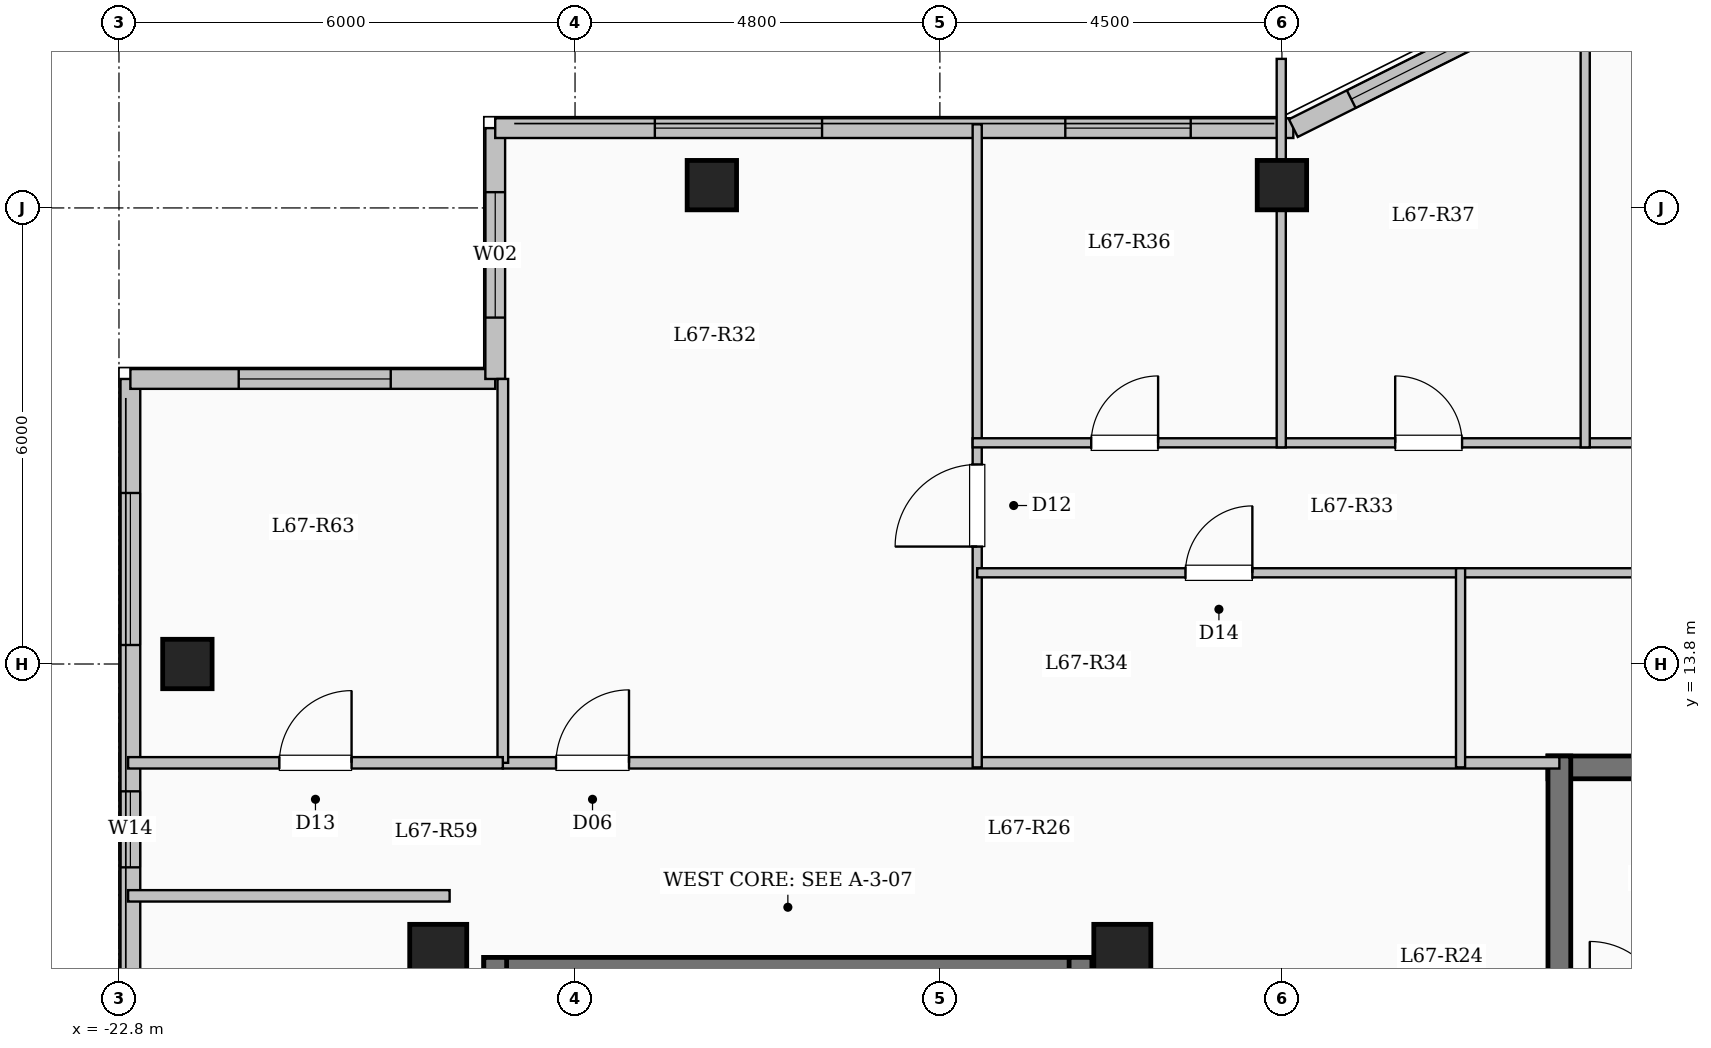
"""IFC4 building model, lengths in metres.
Left out: names, types, materials, properties, quantities, classifications, styles, units other than length and angle.
Written with IfcOpenShell. Run it as: python <this file> out.ifc"""

import sys

from ifc_helpers import new_model, si_unit, direction, frame, frame_2d, origin, origin_2d, place, context, subcontext, project, spatial, rectangle, extrude, element, fill, save


model = new_model("IFC4")
c1 = context("Model", 3, precision=1e-05, world=origin(), true_north=direction((0.0, 1.0)))
c2 = subcontext(c1, "Body", "Model", "MODEL_VIEW")
j1 = project(units=[si_unit("LENGTHUNIT", "METRE"), si_unit("PLANEANGLEUNIT", "RADIAN")], contexts=[c1])
p1 = place(None, origin())
s1 = spatial("IfcSite", under=j1, at=p1, CompositionType="ELEMENT")
p2 = place(p1, origin())
s2 = spatial("IfcBuilding", under=s1, at=p2, CompositionType="ELEMENT")
p3 = place(p2, frame((0.0, 0.0, 248.2)))
s3 = spatial("IfcBuildingStorey", under=s2, at=p3, CompositionType="ELEMENT", Elevation=248.2)
for number, where, z_axis, x_axis in (
    (1, (-9.6, 10.0, 0.0), (0.0, 0.0, 1.0), (1.0, 0.0, 0.0)),
    (2, (-18.6, 10.0, 0.0), (0.0, 0.0, 1.0), (1.0, 0.0, 0.0)),
):
    element("IfcColumn", number, at=place(p3, frame(where, z_axis=z_axis, x_axis=x_axis)), inside=s3, PredefinedType="COLUMN", context=c2, shape_type="SweptSolid", body=[
        extrude(rectangle(XDim=0.75, YDim=0.75, at=origin_2d()), origin(), (0.0, 0.0, 1.0), 3.35),
    ])
for number, where, z_axis, x_axis in (
    (3, (-15.0, 20.1, 0.0), (0.0, 0.0, 1.0), (1.0, 0.0, 0.0)),
    (4, (-7.5, 20.1, 0.0), (0.0, 0.0, 1.0), (1.0, 0.0, 0.0)),
    (5, (-21.9, 13.8, 0.0), (0.0, 0.0, 1.0), (1.0, 0.0, 0.0)),
):
    element("IfcColumn", number, at=place(p3, frame(where, z_axis=z_axis, x_axis=x_axis)), inside=s3, PredefinedType="COLUMN", context=c2, shape_type="SweptSolid", body=[
        extrude(rectangle(XDim=0.65, YDim=0.65, at=origin_2d()), origin(), (0.0, 0.0, 1.0), 3.35),
    ])
p4 = place(p3, frame((-22.65, -17.55, 0.0), z_axis=(0.0, 0.0, 1.0), x_axis=(0.0, 1.0, 0.0)))
e6 = element("IfcWall", 6, at=p4, inside=s3, PredefinedType="SOLIDWALL", context=c2, shape_type="SweptSolid", body=[
    extrude(rectangle(XDim=35.1, YDim=0.26, at=frame_2d((17.55, 0.0))), origin(), (0.0, 0.0, 1.0), 3.1),
])
p5 = place(p4, frame((2.975, 0.0, 0.9)))
e7 = element("IfcOpeningElement", 7, at=p5, cuts=e6, PredefinedType="OPENING", context=c2, shape_type="SweptSolid", body=[
    extrude(rectangle(XDim=2.2, YDim=1.75, at=frame_2d((1.1, 0.875))), frame((0.0, 0.14, 0.0), z_axis=(0.0, -1.0, 0.0), x_axis=(1.0, 0.0, 0.0)), (0.0, 0.0, 1.0), 0.28),
])
p6 = place(p4, frame((8.625, 0.0, 0.95)))
e8 = element("IfcOpeningElement", 8, at=p6, cuts=e6, PredefinedType="OPENING", context=c2, shape_type="SweptSolid", body=[
    extrude(rectangle(XDim=1.2, YDim=1.5, at=frame_2d((0.6, 0.75))), frame((0.0, 0.14, 0.0), z_axis=(0.0, -1.0, 0.0), x_axis=(1.0, 0.0, 0.0)), (0.0, 0.0, 1.0), 0.28),
])
p7 = place(p4, frame((18.3, 0.0, 0.9)))
e9 = element("IfcOpeningElement", 9, at=p7, cuts=e6, PredefinedType="OPENING", context=c2, shape_type="SweptSolid", body=[
    extrude(rectangle(XDim=2.0, YDim=1.7, at=frame_2d((1.0, 0.85))), frame((0.0, 0.14, 0.0), z_axis=(0.0, -1.0, 0.0), x_axis=(1.0, 0.0, 0.0)), (0.0, 0.0, 1.0), 0.28),
])
p8 = place(p4, frame((28.675, 0.0, 0.95)))
e10 = element("IfcOpeningElement", 10, at=p8, cuts=e6, PredefinedType="OPENING", context=c2, shape_type="SweptSolid", body=[
    extrude(rectangle(XDim=1.0, YDim=1.5, at=frame_2d((0.5, 0.75))), frame((0.0, 0.14, 0.0), z_axis=(0.0, -1.0, 0.0), x_axis=(1.0, 0.0, 0.0)), (0.0, 0.0, 1.0), 0.28),
])
p9 = place(p4, frame((31.6, 0.0, 0.9)))
e11 = element("IfcOpeningElement", 11, at=p9, cuts=e6, PredefinedType="OPENING", context=c2, shape_type="SweptSolid", body=[
    extrude(rectangle(XDim=2.0, YDim=1.7, at=frame_2d((1.0, 0.85))), frame((0.0, 0.14, 0.0), z_axis=(0.0, -1.0, 0.0), x_axis=(1.0, 0.0, 0.0)), (0.0, 0.0, 1.0), 0.28),
])
p10 = place(p3, frame((-22.65, 17.55, 0.0), z_axis=(0.0, 0.0, 1.0), x_axis=(1.0, 0.0, 0.0)))
e12 = element("IfcWall", 12, at=p10, inside=s3, PredefinedType="SOLIDWALL", context=c2, shape_type="SweptSolid", body=[
    extrude(rectangle(XDim=4.8, YDim=0.26, at=frame_2d((2.4, 0.0))), origin(), (0.0, 0.0, 1.0), 3.1),
])
p11 = place(p10, frame((1.425, 0.0, 0.9)))
e13 = element("IfcOpeningElement", 13, at=p11, cuts=e12, PredefinedType="OPENING", context=c2, shape_type="SweptSolid", body=[
    extrude(rectangle(XDim=2.0, YDim=1.7, at=frame_2d((1.0, 0.85))), frame((0.0, 0.14, 0.0), z_axis=(0.0, -1.0, 0.0), x_axis=(1.0, 0.0, 0.0)), (0.0, 0.0, 1.0), 0.28),
])
p12 = place(p3, frame((-17.85, 17.55, 0.0), z_axis=(0.0, 0.0, 1.0), x_axis=(0.0, 1.0, 0.0)))
e14 = element("IfcWall", 14, at=p12, inside=s3, PredefinedType="SOLIDWALL", context=c2, shape_type="SweptSolid", body=[
    extrude(rectangle(XDim=3.3, YDim=0.26, at=frame_2d((1.65, 0.0))), origin(), (0.0, 0.0, 1.0), 3.1),
])
p13 = place(p12, frame((0.808, 0.0, 0.9)))
e15 = element("IfcOpeningElement", 15, at=p13, cuts=e14, PredefinedType="OPENING", context=c2, shape_type="SweptSolid", body=[
    extrude(rectangle(XDim=1.65, YDim=1.6, at=frame_2d((0.825, 0.8))), frame((0.0, 0.14, 0.0), z_axis=(0.0, -1.0, 0.0), x_axis=(1.0, 0.0, 0.0)), (0.0, 0.0, 1.0), 0.28),
])
p14 = place(p3, frame((-17.85, 20.85, 0.0), z_axis=(0.0, 0.0, 1.0), x_axis=(1.0, 0.0, 0.0)))
e16 = element("IfcWall", 16, at=p14, inside=s3, PredefinedType="SOLIDWALL", context=c2, shape_type="SweptSolid", body=[
    extrude(rectangle(XDim=10.5, YDim=0.26, at=frame_2d((5.25, 0.0))), origin(), (0.0, 0.0, 1.0), 3.1),
])
p15 = place(p14, frame((2.1, 0.0, 0.9)))
e17 = element("IfcOpeningElement", 17, at=p15, cuts=e16, PredefinedType="OPENING", context=c2, shape_type="SweptSolid", body=[
    extrude(rectangle(XDim=2.2, YDim=1.75, at=frame_2d((1.1, 0.875))), frame((0.0, 0.14, 0.0), z_axis=(0.0, -1.0, 0.0), x_axis=(1.0, 0.0, 0.0)), (0.0, 0.0, 1.0), 0.28),
])
p16 = place(p14, frame((7.5, 0.0, 0.9)))
e18 = element("IfcOpeningElement", 18, at=p16, cuts=e16, PredefinedType="OPENING", context=c2, shape_type="SweptSolid", body=[
    extrude(rectangle(XDim=1.65, YDim=1.6, at=frame_2d((0.825, 0.8))), frame((0.0, 0.14, 0.0), z_axis=(0.0, -1.0, 0.0), x_axis=(1.0, 0.0, 0.0)), (0.0, 0.0, 1.0), 0.28),
])
p17 = place(p3, frame((-7.35, 20.85, 0.0), z_axis=(0.0, 0.0, 1.0), x_axis=(0.894427191, 0.4472135955, 0.0)))
e19 = element("IfcWall", 19, at=p17, inside=s3, PredefinedType="SOLIDWALL", context=c2, shape_type="SweptSolid", body=[
    extrude(rectangle(XDim=3.354, YDim=0.26, at=frame_2d((1.677, 0.0))), origin(), (0.0, 0.0, 1.0), 3.1),
])
p18 = place(p17, frame((0.852, 0.0, 0.9)))
e20 = element("IfcOpeningElement", 20, at=p18, cuts=e19, PredefinedType="OPENING", context=c2, shape_type="SweptSolid", body=[
    extrude(rectangle(XDim=1.65, YDim=1.6, at=frame_2d((0.825, 0.8))), frame((0.0, 0.14, 0.0), z_axis=(0.0, -1.0, 0.0), x_axis=(1.0, 0.0, 0.0)), (0.0, 0.0, 1.0), 0.28),
])
p19 = place(p3, frame((-18.0, 9.79, 0.0), z_axis=(0.0, 0.0, 1.0), x_axis=(1.0, 0.0, 0.0)))
e21 = element("IfcWall", 21, at=p19, inside=s3, PredefinedType="SHEAR", context=c2, shape_type="SweptSolid", body=[
    extrude(rectangle(XDim=8.0, YDim=0.3, at=frame_2d((4.0, 0.0))), origin(), (0.0, 0.0, 1.0), 3.35),
])
for number, where, z_axis, x_axis in (
    (22, (-17.85, 6.35, 0.0), (0.0, 0.0, 1.0), (0.0, 1.0, 0.0)),
    (23, (-10.15, 6.35, 0.0), (0.0, 0.0, 1.0), (0.0, 1.0, 0.0)),
):
    element("IfcWall", number, at=place(p3, frame(where, z_axis=z_axis, x_axis=x_axis)), inside=s3, PredefinedType="SHEAR", context=c2, shape_type="SweptSolid", body=[
        extrude(rectangle(XDim=3.59, YDim=0.3, at=frame_2d((1.795, 0.0))), origin(), (0.0, 0.0, 1.0), 3.35),
    ])
p20 = place(p3, frame((-4.0, 12.44, 0.0), z_axis=(0.0, 0.0, 1.0), x_axis=(1.0, 0.0, 0.0)))
e24 = element("IfcWall", 24, at=p20, inside=s3, PredefinedType="SHEAR", context=c2, shape_type="SweptSolid", body=[
    extrude(rectangle(XDim=8.0, YDim=0.3, at=frame_2d((4.0, 0.0))), origin(), (0.0, 0.0, 1.0), 3.35),
])
p21 = place(p3, frame((-3.85, 9.0, 0.0), z_axis=(0.0, 0.0, 1.0), x_axis=(0.0, 1.0, 0.0)))
e25 = element("IfcWall", 25, at=p21, inside=s3, PredefinedType="SHEAR", context=c2, shape_type="SweptSolid", body=[
    extrude(rectangle(XDim=3.59, YDim=0.3, at=frame_2d((1.795, 0.0))), origin(), (0.0, 0.0, 1.0), 3.35),
])
p22 = place(p3, frame((-17.75, 12.5, 0.0), z_axis=(0.0, 0.0, 1.0), x_axis=(1.0, 0.0, 0.0)))
e26 = element("IfcWall", 26, at=p22, inside=s3, PredefinedType="PARTITIONING", context=c2, shape_type="SweptSolid", body=[
    extrude(rectangle(XDim=13.9, YDim=0.15, at=frame_2d((6.95, 0.0))), origin(), (0.0, 0.0, 1.0), 3.1),
])
p23 = place(p22, frame((0.7, 0.0, 0.0)))
e27 = element("IfcOpeningElement", 27, at=p23, cuts=e26, PredefinedType="OPENING", context=c2, shape_type="SweptSolid", body=[
    extrude(rectangle(XDim=0.96, YDim=2.15, at=frame_2d((0.48, 1.075))), frame((0.0, 0.085, 0.0), z_axis=(0.0, -1.0, 0.0), x_axis=(1.0, 0.0, 0.0)), (0.0, 0.0, 1.0), 0.17),
])
p24 = place(p3, frame((-11.509, 12.44, 0.0), z_axis=(0.0, 0.0, 1.0), x_axis=(0.0, 1.0, 0.0)))
e28 = element("IfcWall", 28, at=p24, inside=s3, PredefinedType="PARTITIONING", context=c2, shape_type="SweptSolid", body=[
    extrude(rectangle(XDim=8.46, YDim=0.12, at=frame_2d((4.23, 0.0))), origin(), (0.0, 0.0, 1.0), 3.1),
])
p25 = place(p24, frame((2.905, 0.0, 0.0)))
e29 = element("IfcOpeningElement", 29, at=p25, cuts=e28, PredefinedType="OPENING", context=c2, shape_type="SweptSolid", body=[
    extrude(rectangle(XDim=1.08, YDim=2.15, at=frame_2d((0.54, 1.075))), frame((0.0, 0.07, 0.0), z_axis=(0.0, -1.0, 0.0), x_axis=(1.0, 0.0, 0.0)), (0.0, 0.0, 1.0), 0.14),
])
p26 = place(p3, frame((-11.509, 15.0, 0.0), z_axis=(0.0, 0.0, 1.0), x_axis=(1.0, 0.0, 0.0)))
e30 = element("IfcWall", 30, at=p26, inside=s3, PredefinedType="PARTITIONING", context=c2, shape_type="SweptSolid", body=[
    extrude(rectangle(XDim=6.359, YDim=0.12, at=frame_2d((3.18, 0.0))), origin(), (0.0, 0.0, 1.0), 3.1),
])
p27 = place(p26, frame((2.74, 0.0, 0.0)))
e31 = element("IfcOpeningElement", 31, at=p27, cuts=e30, PredefinedType="OPENING", context=c2, shape_type="SweptSolid", body=[
    extrude(rectangle(XDim=0.88, YDim=2.1, at=frame_2d((0.44, 1.05))), frame((0.0, 0.07, 0.0), z_axis=(0.0, -1.0, 0.0), x_axis=(1.0, 0.0, 0.0)), (0.0, 0.0, 1.0), 0.14),
])
p28 = place(p3, frame((-5.15, 15.0, 0.0), z_axis=(0.0, 0.0, 1.0), x_axis=(1.0, 0.0, 0.0)))
e32 = element("IfcWall", 32, at=p28, inside=s3, PredefinedType="PARTITIONING", context=c2, shape_type="SweptSolid", body=[
    extrude(rectangle(XDim=5.7, YDim=0.12, at=frame_2d((2.85, 0.0))), origin(), (0.0, 0.0, 1.0), 3.1),
])
p29 = place(p28, frame((2.41, 0.0, 0.0)))
e33 = element("IfcOpeningElement", 33, at=p29, cuts=e32, PredefinedType="OPENING", context=c2, shape_type="SweptSolid", body=[
    extrude(rectangle(XDim=0.88, YDim=2.1, at=frame_2d((0.44, 1.05))), frame((0.0, 0.07, 0.0), z_axis=(0.0, -1.0, 0.0), x_axis=(1.0, 0.0, 0.0)), (0.0, 0.0, 1.0), 0.14),
])
p30 = place(p3, frame((-11.569, 16.71, 0.0), z_axis=(0.0, 0.0, 1.0), x_axis=(1.0, 0.0, 0.0)))
e34 = element("IfcWall", 34, at=p30, inside=s3, PredefinedType="PARTITIONING", context=c2, shape_type="SweptSolid", body=[
    extrude(rectangle(XDim=12.179, YDim=0.12, at=frame_2d((6.09, 0.0))), origin(), (0.0, 0.0, 1.0), 2.785),
])
p31 = place(p30, frame((1.56, 0.0, 0.0)))
e35 = element("IfcOpeningElement", 35, at=p31, cuts=e34, PredefinedType="OPENING", context=c2, shape_type="SweptSolid", body=[
    extrude(rectangle(XDim=0.88, YDim=2.1, at=frame_2d((0.44, 1.05))), frame((0.0, 0.07, 0.0), z_axis=(0.0, -1.0, 0.0), x_axis=(1.0, 0.0, 0.0)), (0.0, 0.0, 1.0), 0.14),
])
p32 = place(p30, frame((5.559, 0.0, 0.0)))
e36 = element("IfcOpeningElement", 36, at=p32, cuts=e34, PredefinedType="OPENING", context=c2, shape_type="SweptSolid", body=[
    extrude(rectangle(XDim=0.88, YDim=2.1, at=frame_2d((0.44, 1.05))), frame((0.0, 0.07, 0.0), z_axis=(0.0, -1.0, 0.0), x_axis=(1.0, 0.0, 0.0)), (0.0, 0.0, 1.0), 0.14),
])
p33 = place(p30, frame((9.559, 0.0, 0.0)))
e37 = element("IfcOpeningElement", 37, at=p33, cuts=e34, PredefinedType="OPENING", context=c2, shape_type="SweptSolid", body=[
    extrude(rectangle(XDim=0.88, YDim=2.1, at=frame_2d((0.44, 1.05))), frame((0.0, 0.07, 0.0), z_axis=(0.0, -1.0, 0.0), x_axis=(1.0, 0.0, 0.0)), (0.0, 0.0, 1.0), 0.14),
])
p34 = place(p3, frame((-5.15, 12.44, 0.0), z_axis=(0.0, 0.0, 1.0), x_axis=(0.0, 1.0, 0.0)))
e38 = element("IfcWall", 38, at=p34, inside=s3, PredefinedType="PARTITIONING", context=c2, shape_type="SweptSolid", body=[
    extrude(rectangle(XDim=2.62, YDim=0.12, at=frame_2d((1.31, 0.0))), origin(), (0.0, 0.0, 1.0), 3.1),
])
p35 = place(p3, frame((-7.509, 16.65, 0.0), z_axis=(0.0, 0.0, 1.0), x_axis=(0.0, 1.0, 0.0)))
e39 = element("IfcWall", 39, at=p35, inside=s3, PredefinedType="PARTITIONING", context=c2, shape_type="SweptSolid", body=[
    extrude(rectangle(XDim=5.111, YDim=0.12, at=frame_2d((2.556, 0.0))), origin(), (0.0, 0.0, 1.0), 2.685),
])
p36 = place(p3, frame((-3.51, 16.65, 0.0), z_axis=(0.0, 0.0, 1.0), x_axis=(0.0, 1.0, 0.0)))
e40 = element("IfcWall", 40, at=p36, inside=s3, PredefinedType="PARTITIONING", context=c2, shape_type="SweptSolid", body=[
    extrude(rectangle(XDim=5.73, YDim=0.12, at=frame_2d((2.865, 0.0))), origin(), (0.0, 0.0, 1.0), 3.1),
])
p37 = place(p3, frame((-22.68, 10.75, 0.0), z_axis=(0.0, 0.0, 1.0), x_axis=(1.0, 0.0, 0.0)))
e41 = element("IfcWall", 41, at=p37, inside=s3, PredefinedType="PARTITIONING", context=c2, shape_type="SweptSolid", body=[
    extrude(rectangle(XDim=4.23, YDim=0.15, at=frame_2d((2.115, 0.0))), origin(), (0.0, 0.0, 1.0), 3.1),
])
p38 = place(p3, frame((-17.75, 12.5, 0.0), z_axis=(0.0, 0.0, 1.0), x_axis=(0.0, 1.0, 0.0)))
e42 = element("IfcWall", 42, at=p38, inside=s3, PredefinedType="PARTITIONING", context=c2, shape_type="SweptSolid", body=[
    extrude(rectangle(XDim=5.05, YDim=0.14, at=frame_2d((2.525, 0.0))), origin(), (0.0, 0.0, 1.0), 3.1),
])
p39 = place(p3, frame((-22.68, 12.5, 0.0), z_axis=(0.0, 0.0, 1.0), x_axis=(1.0, 0.0, 0.0)))
e43 = element("IfcWall", 43, at=p39, inside=s3, PredefinedType="PARTITIONING", context=c2, shape_type="SweptSolid", body=[
    extrude(rectangle(XDim=4.93, YDim=0.15, at=frame_2d((2.465, 0.0))), origin(), (0.0, 0.0, 1.0), 3.1),
])
p40 = place(p39, frame((1.99, 0.0, 0.0)))
e44 = element("IfcOpeningElement", 44, at=p40, cuts=e43, PredefinedType="OPENING", context=c2, shape_type="SweptSolid", body=[
    extrude(rectangle(XDim=0.95, YDim=2.15, at=frame_2d((0.475, 1.075))), frame((0.0, 0.085, 0.0), z_axis=(0.0, -1.0, 0.0), x_axis=(1.0, 0.0, 0.0)), (0.0, 0.0, 1.0), 0.17),
])
p41 = place(p8, origin())
e45 = element("IfcWindow", 45, at=p41, inside=s3, PartitioningType="SINGLE_PANEL", PredefinedType="WINDOW", context=c2, shape_type="SweptSolid", body=[
    extrude(rectangle(XDim=1.0, YDim=1.5, at=frame_2d((0.5, 0.75))), frame((0.0, 0.03, 0.0), z_axis=(0.0, -1.0, 0.0), x_axis=(1.0, 0.0, 0.0)), (0.0, 0.0, 1.0), 0.06),
])
fill(e10, e45)
p42 = place(p9, origin())
e46 = element("IfcWindow", 46, at=p42, inside=s3, PartitioningType="SINGLE_PANEL", PredefinedType="WINDOW", context=c2, shape_type="SweptSolid", body=[
    extrude(rectangle(XDim=2.0, YDim=1.7, at=frame_2d((1.0, 0.85))), frame((0.0, 0.03, 0.0), z_axis=(0.0, -1.0, 0.0), x_axis=(1.0, 0.0, 0.0)), (0.0, 0.0, 1.0), 0.06),
])
fill(e11, e46)
p43 = place(p11, origin())
e47 = element("IfcWindow", 47, at=p43, inside=s3, PartitioningType="SINGLE_PANEL", PredefinedType="WINDOW", context=c2, shape_type="SweptSolid", body=[
    extrude(rectangle(XDim=2.0, YDim=1.7, at=frame_2d((1.0, 0.85))), frame((0.0, 0.03, 0.0), z_axis=(0.0, -1.0, 0.0), x_axis=(1.0, 0.0, 0.0)), (0.0, 0.0, 1.0), 0.06),
])
fill(e13, e47)
p44 = place(p13, origin())
e48 = element("IfcWindow", 48, at=p44, inside=s3, PartitioningType="SINGLE_PANEL", PredefinedType="WINDOW", context=c2, shape_type="SweptSolid", body=[
    extrude(rectangle(XDim=1.65, YDim=1.6, at=frame_2d((0.825, 0.8))), frame((0.0, 0.03, 0.0), z_axis=(0.0, -1.0, 0.0), x_axis=(1.0, 0.0, 0.0)), (0.0, 0.0, 1.0), 0.06),
])
fill(e15, e48)
p45 = place(p15, origin())
e49 = element("IfcWindow", 49, at=p45, inside=s3, PartitioningType="SINGLE_PANEL", PredefinedType="WINDOW", context=c2, shape_type="SweptSolid", body=[
    extrude(rectangle(XDim=2.2, YDim=1.75, at=frame_2d((1.1, 0.875))), frame((0.0, 0.03, 0.0), z_axis=(0.0, -1.0, 0.0), x_axis=(1.0, 0.0, 0.0)), (0.0, 0.0, 1.0), 0.06),
])
fill(e17, e49)
p46 = place(p16, origin())
e50 = element("IfcWindow", 50, at=p46, inside=s3, PartitioningType="SINGLE_PANEL", PredefinedType="WINDOW", context=c2, shape_type="SweptSolid", body=[
    extrude(rectangle(XDim=1.65, YDim=1.6, at=frame_2d((0.825, 0.8))), frame((0.0, 0.03, 0.0), z_axis=(0.0, -1.0, 0.0), x_axis=(1.0, 0.0, 0.0)), (0.0, 0.0, 1.0), 0.06),
])
fill(e18, e50)
p47 = place(p18, origin())
e51 = element("IfcWindow", 51, at=p47, inside=s3, PartitioningType="SINGLE_PANEL", PredefinedType="WINDOW", context=c2, shape_type="SweptSolid", body=[
    extrude(rectangle(XDim=1.65, YDim=1.6, at=frame_2d((0.825, 0.8))), frame((0.0, 0.03, 0.0), z_axis=(0.0, -1.0, 0.0), x_axis=(1.0, 0.0, 0.0)), (0.0, 0.0, 1.0), 0.06),
])
fill(e20, e51)
p48 = place(p23, origin())
e52 = element("IfcDoor", 52, at=p48, inside=s3, OperationType="SINGLE_SWING_RIGHT", PredefinedType="DOOR", context=c2, shape_type="SweptSolid", body=[
    extrude(rectangle(XDim=0.96, YDim=2.15, at=frame_2d((0.48, 1.075))), frame((0.0, 0.025, 0.0), z_axis=(0.0, -1.0, 0.0), x_axis=(1.0, 0.0, 0.0)), (0.0, 0.0, 1.0), 0.05),
])
fill(e27, e52)
p49 = place(p25, origin())
e53 = element("IfcDoor", 53, at=p49, inside=s3, OperationType="SINGLE_SWING_LEFT", PredefinedType="DOOR", context=c2, shape_type="SweptSolid", body=[
    extrude(rectangle(XDim=1.08, YDim=2.15, at=frame_2d((0.54, 1.075))), frame((0.0, 0.025, 0.0), z_axis=(0.0, -1.0, 0.0), x_axis=(1.0, 0.0, 0.0)), (0.0, 0.0, 1.0), 0.05),
])
fill(e29, e53)
p50 = place(p27, origin())
e54 = element("IfcDoor", 54, at=p50, inside=s3, OperationType="SINGLE_SWING_RIGHT", PredefinedType="DOOR", context=c2, shape_type="SweptSolid", body=[
    extrude(rectangle(XDim=0.88, YDim=2.1, at=frame_2d((0.44, 1.05))), frame((0.0, 0.025, 0.0), z_axis=(0.0, -1.0, 0.0), x_axis=(1.0, 0.0, 0.0)), (0.0, 0.0, 1.0), 0.05),
])
fill(e31, e54)
p51 = place(p31, origin())
e55 = element("IfcDoor", 55, at=p51, inside=s3, OperationType="SINGLE_SWING_RIGHT", PredefinedType="DOOR", context=c2, shape_type="SweptSolid", body=[
    extrude(rectangle(XDim=0.88, YDim=2.1, at=frame_2d((0.44, 1.05))), frame((0.0, 0.025, 0.0), z_axis=(0.0, -1.0, 0.0), x_axis=(1.0, 0.0, 0.0)), (0.0, 0.0, 1.0), 0.05),
])
fill(e35, e55)
p52 = place(p32, origin())
e56 = element("IfcDoor", 56, at=p52, inside=s3, OperationType="SINGLE_SWING_LEFT", PredefinedType="DOOR", context=c2, shape_type="SweptSolid", body=[
    extrude(rectangle(XDim=0.88, YDim=2.1, at=frame_2d((0.44, 1.05))), frame((0.0, 0.025, 0.0), z_axis=(0.0, -1.0, 0.0), x_axis=(1.0, 0.0, 0.0)), (0.0, 0.0, 1.0), 0.05),
])
fill(e36, e56)
p53 = place(p40, origin())
e57 = element("IfcDoor", 57, at=p53, inside=s3, OperationType="SINGLE_SWING_RIGHT", PredefinedType="DOOR", context=c2, shape_type="SweptSolid", body=[
    extrude(rectangle(XDim=0.95, YDim=2.15, at=frame_2d((0.475, 1.075))), frame((0.0, 0.025, 0.0), z_axis=(0.0, -1.0, 0.0), x_axis=(1.0, 0.0, 0.0)), (0.0, 0.0, 1.0), 0.05),
])
fill(e44, e57)
save(model, sys.argv[1])
